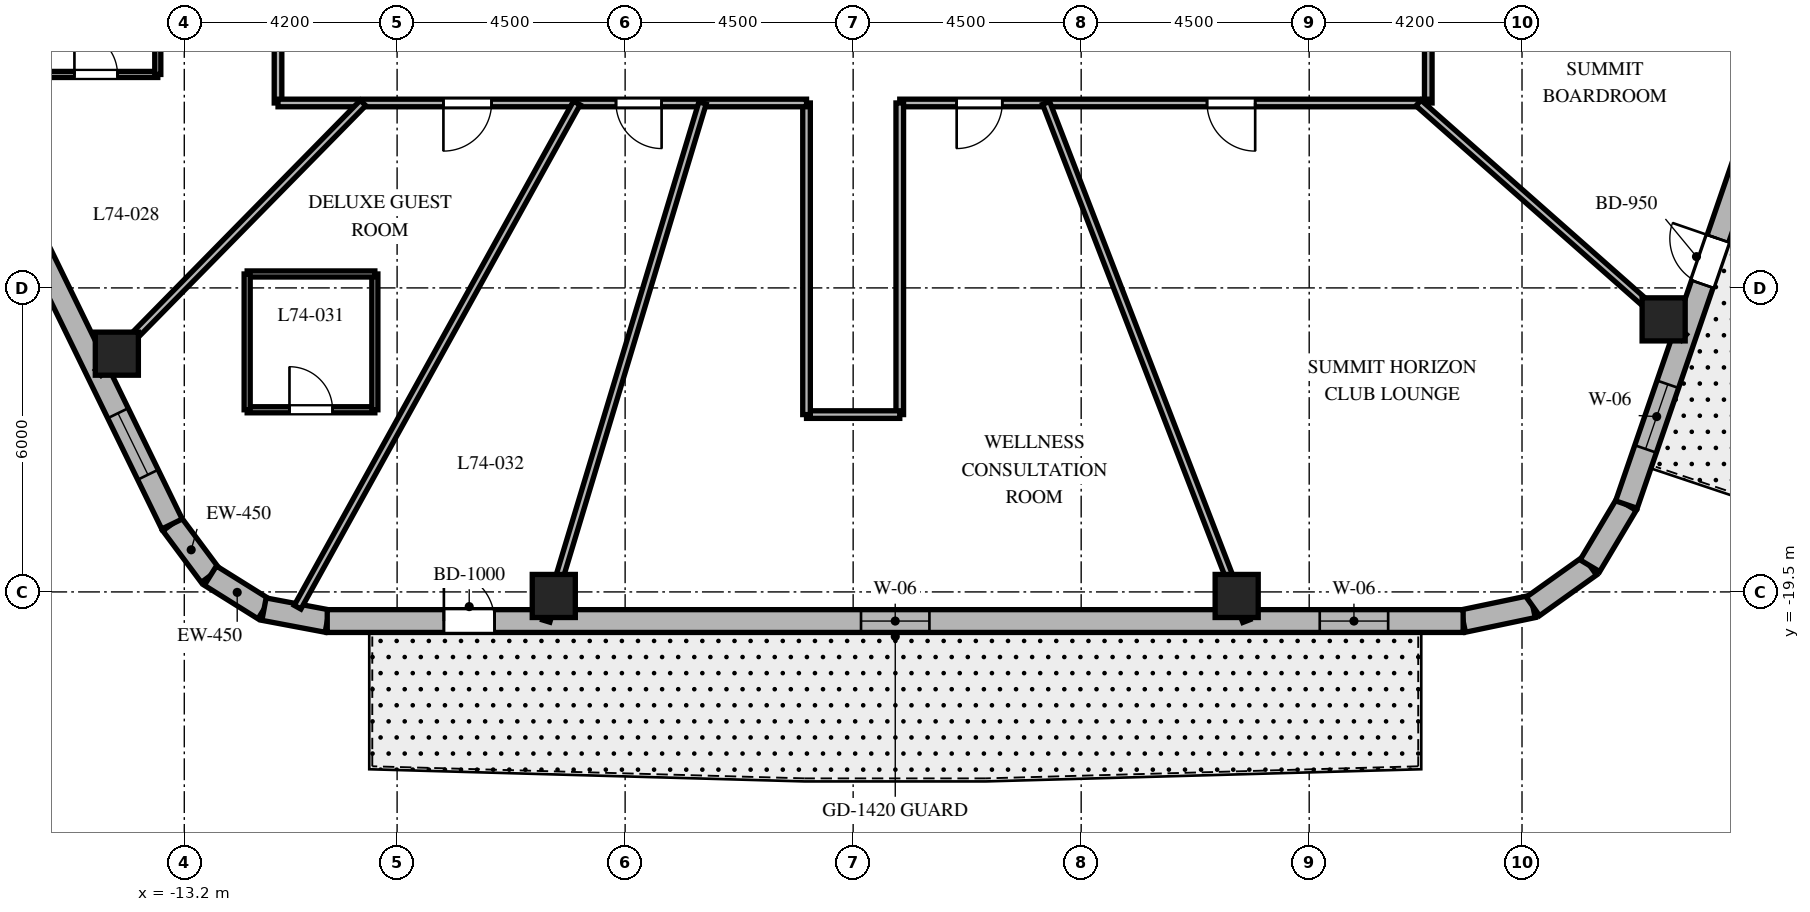
"""IFC4 building model, lengths in metres.
Left out: names, types, materials, properties, quantities, classifications, styles, units other than length and angle.
Written with IfcOpenShell. Run it as: python <this file> out.ifc"""

import sys

from ifc_helpers import new_model, si_unit, direction, frame, frame_2d, origin, origin_2d, place, context, subcontext, project, spatial, rectangle, extrude, element, fill, save


model = new_model("IFC4")
c1 = context("Model", 3, precision=1e-05, world=origin(), true_north=direction((0.0, 1.0)))
c2 = subcontext(c1, "Body", "Model", "MODEL_VIEW")
j1 = project(units=[si_unit("LENGTHUNIT", "METRE"), si_unit("PLANEANGLEUNIT", "RADIAN")], contexts=[c1])
p1 = place(None, origin())
s1 = spatial("IfcSite", under=j1, at=p1, CompositionType="ELEMENT")
p2 = place(p1, origin())
s2 = spatial("IfcBuilding", under=s1, at=p2, CompositionType="ELEMENT")
p3 = place(p2, frame((0.0, 0.0, 297.6)))
s3 = spatial("IfcBuildingStorey", under=s2, at=p3, CompositionType="ELEMENT", Elevation=297.6)
for number, where, z_axis, x_axis in (
    (1, (-5.908, -19.58, 0.0), (0.0, 0.0, 1.0), (1.0, 0.0, 0.0)),
    (2, (7.569, -19.58, 0.0), (0.0, 0.0, 1.0), (1.0, 0.0, 0.0)),
    (3, (15.995, -14.121, 0.0), (0.0, 0.0, 1.0), (1.0, 0.0, 0.0)),
    (4, (-14.531, -14.798, 0.0), (0.0, 0.0, 1.0), (1.0, 0.0, 0.0)),
):
    element("IfcColumn", number, at=place(p3, frame(where, z_axis=z_axis, x_axis=x_axis)), inside=s3, PredefinedType="COLUMN", context=c2, shape_type="SweptSolid", body=[
        extrude(rectangle(XDim=0.85, YDim=0.85, at=origin_2d()), origin(), (0.0, 0.0, 1.0), 3.9),
    ])
p4 = place(p3, frame((-13.443, -18.16, 0.0), z_axis=(0.0, 0.0, 1.0), x_axis=(0.597042425808, -0.802209661987, 0.0)))
e5 = element("IfcWall", 5, at=p4, inside=s3, PredefinedType="SOLIDWALL", context=c2, shape_type="SweptSolid", body=[
    extrude(rectangle(XDim=1.27, YDim=0.45, at=frame_2d((0.635, 0.0))), origin(), (0.0, 0.0, 1.0), 3.6),
])
p5 = place(p3, frame((-12.685, -19.178, 0.0), z_axis=(0.0, 0.0, 1.0), x_axis=(0.848031272749, -0.529946186362, 0.0)))
e6 = element("IfcWall", 6, at=p5, inside=s3, PredefinedType="SOLIDWALL", context=c2, shape_type="SweptSolid", body=[
    extrude(rectangle(XDim=1.248, YDim=0.45, at=frame_2d((0.624, 0.0))), origin(), (0.0, 0.0, 1.0), 3.6),
])
p6 = place(p3, frame((-11.626, -19.84, 0.0), z_axis=(0.0, 0.0, 1.0), x_axis=(0.982701956681, -0.185194126083, 0.0)))
e7 = element("IfcWall", 7, at=p6, inside=s3, PredefinedType="SOLIDWALL", context=c2, shape_type="SweptSolid", body=[
    extrude(rectangle(XDim=1.27, YDim=0.45, at=frame_2d((0.635, 0.0))), origin(), (0.0, 0.0, 1.0), 3.6),
])
p7 = place(p3, frame((12.038, -20.075, 0.0), z_axis=(0.0, 0.0, 1.0), x_axis=(0.978750122553, 0.205056571711, 0.0)))
e8 = element("IfcWall", 8, at=p7, inside=s3, PredefinedType="SOLIDWALL", context=c2, shape_type="SweptSolid", body=[
    extrude(rectangle(XDim=1.406, YDim=0.45, at=frame_2d((0.703, 0.0))), origin(), (0.0, 0.0, 1.0), 3.6),
])
p8 = place(p3, frame((13.415, -19.787, 0.0), z_axis=(0.0, 0.0, 1.0), x_axis=(0.814055493997, 0.580787097561, 0.0)))
e9 = element("IfcWall", 9, at=p8, inside=s3, PredefinedType="SOLIDWALL", context=c2, shape_type="SweptSolid", body=[
    extrude(rectangle(XDim=1.383, YDim=0.45, at=frame_2d((0.691, 0.0))), origin(), (0.0, 0.0, 1.0), 3.6),
])
p9 = place(p3, frame((14.54, -18.984, 0.0), z_axis=(0.0, 0.0, 1.0), x_axis=(0.512374906623, 0.858761873317, 0.0)))
e10 = element("IfcWall", 10, at=p9, inside=s3, PredefinedType="SOLIDWALL", context=c2, shape_type="SweptSolid", body=[
    extrude(rectangle(XDim=1.406, YDim=0.45, at=frame_2d((0.703, 0.0))), origin(), (0.0, 0.0, 1.0), 3.6),
])
p10 = place(p3, frame((-10.379, -20.075, 0.0), z_axis=(0.0, 0.0, 1.0), x_axis=(1.0, 0.0, 0.0)))
e11 = element("IfcWall", 11, at=p10, inside=s3, PredefinedType="SOLIDWALL", context=c2, shape_type="SweptSolid", body=[
    extrude(rectangle(XDim=22.417, YDim=0.45, at=frame_2d((11.208, 0.0))), origin(), (0.0, 0.0, 1.0), 3.6),
])
p11 = place(p10, frame((2.302, 0.0, 0.0)))
e12 = element("IfcOpeningElement", 12, at=p11, cuts=e11, PredefinedType="OPENING", context=c2, shape_type="SweptSolid", body=[
    extrude(rectangle(XDim=1.0, YDim=2.15, at=frame_2d((0.5, 1.075))), frame((0.0, 0.235, 0.0), z_axis=(0.0, -1.0, 0.0), x_axis=(1.0, 0.0, 0.0)), (0.0, 0.0, 1.0), 0.47),
])
p12 = place(p10, frame((10.534, 0.0, 0.8)))
e13 = element("IfcOpeningElement", 13, at=p12, cuts=e11, PredefinedType="OPENING", context=c2, shape_type="SweptSolid", body=[
    extrude(rectangle(XDim=1.35, YDim=1.75, at=frame_2d((0.675, 0.875))), frame((0.0, 0.235, 0.0), z_axis=(0.0, -1.0, 0.0), x_axis=(1.0, 0.0, 0.0)), (0.0, 0.0, 1.0), 0.47),
])
p13 = place(p10, frame((19.587, 0.0, 0.8)))
e14 = element("IfcOpeningElement", 14, at=p13, cuts=e11, PredefinedType="OPENING", context=c2, shape_type="SweptSolid", body=[
    extrude(rectangle(XDim=1.35, YDim=1.75, at=frame_2d((0.675, 0.875))), frame((0.0, 0.235, 0.0), z_axis=(0.0, -1.0, 0.0), x_axis=(1.0, 0.0, 0.0)), (0.0, 0.0, 1.0), 0.47),
])
p14 = place(p3, frame((15.26, -17.776, 0.0), z_axis=(0.0, 0.0, 1.0), x_axis=(0.325407437101, 0.945573899745, 0.0)))
e15 = element("IfcWall", 15, at=p14, inside=s3, PredefinedType="SOLIDWALL", context=c2, shape_type="SweptSolid", body=[
    extrude(rectangle(XDim=18.552, YDim=0.45, at=frame_2d((9.276, 0.0))), origin(), (0.0, 0.0, 1.0), 3.6),
])
p15 = place(p14, frame((4.602, 0.0, 0.0)))
e16 = element("IfcOpeningElement", 16, at=p15, cuts=e15, PredefinedType="OPENING", context=c2, shape_type="SweptSolid", body=[
    extrude(rectangle(XDim=0.95, YDim=2.15, at=frame_2d((0.475, 1.075))), frame((0.0, 0.235, 0.0), z_axis=(0.0, -1.0, 0.0), x_axis=(1.0, 0.0, 0.0)), (0.0, 0.0, 1.0), 0.47),
])
p16 = place(p14, frame((1.161, 0.0, 0.8)))
e17 = element("IfcOpeningElement", 17, at=p16, cuts=e15, PredefinedType="OPENING", context=c2, shape_type="SweptSolid", body=[
    extrude(rectangle(XDim=1.35, YDim=1.75, at=frame_2d((0.675, 0.875))), frame((0.0, 0.235, 0.0), z_axis=(0.0, -1.0, 0.0), x_axis=(1.0, 0.0, 0.0)), (0.0, 0.0, 1.0), 0.47),
])
p17 = place(p14, frame((8.548, 0.0, 0.8)))
e18 = element("IfcOpeningElement", 18, at=p17, cuts=e15, PredefinedType="OPENING", context=c2, shape_type="SweptSolid", body=[
    extrude(rectangle(XDim=1.35, YDim=1.75, at=frame_2d((0.675, 0.875))), frame((0.0, 0.235, 0.0), z_axis=(0.0, -1.0, 0.0), x_axis=(1.0, 0.0, 0.0)), (0.0, 0.0, 1.0), 0.47),
])
p18 = place(p14, frame((15.987, 0.0, 0.8)))
e19 = element("IfcOpeningElement", 19, at=p18, cuts=e15, PredefinedType="OPENING", context=c2, shape_type="SweptSolid", body=[
    extrude(rectangle(XDim=1.35, YDim=1.75, at=frame_2d((0.675, 0.875))), frame((0.0, 0.235, 0.0), z_axis=(0.0, -1.0, 0.0), x_axis=(1.0, 0.0, 0.0)), (0.0, 0.0, 1.0), 0.47),
])
p19 = place(p3, frame((-21.138, -2.371, 0.0), z_axis=(0.0, 0.0, 1.0), x_axis=(0.438128124058, -0.89891253574, 0.0)))
e20 = element("IfcWall", 20, at=p19, inside=s3, PredefinedType="SOLIDWALL", context=c2, shape_type="SweptSolid", body=[
    extrude(rectangle(XDim=17.565, YDim=0.45, at=frame_2d((8.782, 0.0))), origin(), (0.0, 0.0, 1.0), 3.6),
])
p20 = place(p19, frame((1.133, 0.0, 0.8)))
e21 = element("IfcOpeningElement", 21, at=p20, cuts=e20, PredefinedType="OPENING", context=c2, shape_type="SweptSolid", body=[
    extrude(rectangle(XDim=1.35, YDim=1.75, at=frame_2d((0.675, 0.875))), frame((0.0, 0.235, 0.0), z_axis=(0.0, -1.0, 0.0), x_axis=(1.0, 0.0, 0.0)), (0.0, 0.0, 1.0), 0.47),
])
p21 = place(p19, frame((8.158, 0.0, 0.8)))
e22 = element("IfcOpeningElement", 22, at=p21, cuts=e20, PredefinedType="OPENING", context=c2, shape_type="SweptSolid", body=[
    extrude(rectangle(XDim=1.35, YDim=1.75, at=frame_2d((0.675, 0.875))), frame((0.0, 0.235, 0.0), z_axis=(0.0, -1.0, 0.0), x_axis=(1.0, 0.0, 0.0)), (0.0, 0.0, 1.0), 0.47),
])
p22 = place(p19, frame((15.132, 0.0, 0.8)))
e23 = element("IfcOpeningElement", 23, at=p22, cuts=e20, PredefinedType="OPENING", context=c2, shape_type="SweptSolid", body=[
    extrude(rectangle(XDim=1.35, YDim=1.75, at=frame_2d((0.675, 0.875))), frame((0.0, 0.235, 0.0), z_axis=(0.0, -1.0, 0.0), x_axis=(1.0, 0.0, 0.0)), (0.0, 0.0, 1.0), 0.47),
])
p23 = place(p3, frame((-11.35, -9.85, 0.0), z_axis=(0.0, 0.0, 1.0), x_axis=(0.0, 1.0, 0.0)))
e24 = element("IfcWall", 24, at=p23, inside=s3, PredefinedType="PARTITIONING", context=c2, shape_type="SweptSolid", body=[
    extrude(rectangle(XDim=12.4, YDim=0.15, at=frame_2d((6.2, 0.0))), origin(), (0.0, 0.0, 1.0), 2.894),
])
p24 = place(p23, frame((8.81, 0.0, 0.0)))
e25 = element("IfcOpeningElement", 25, at=p24, cuts=e24, PredefinedType="OPENING", context=c2, shape_type="SweptSolid", body=[
    extrude(rectangle(XDim=1.0, YDim=2.03, at=frame_2d((0.5, 1.015))), frame((0.0, 0.085, 0.0), z_axis=(0.0, -1.0, 0.0), x_axis=(1.0, 0.0, 0.0)), (0.0, 0.0, 1.0), 0.17),
])
p25 = place(p3, frame((11.35, -4.4, 0.0), z_axis=(0.0, 0.0, 1.0), x_axis=(0.0, -1.0, 0.0)))
e26 = element("IfcWall", 26, at=p25, inside=s3, PredefinedType="PARTITIONING", context=c2, shape_type="SweptSolid", body=[
    extrude(rectangle(XDim=5.45, YDim=0.15, at=frame_2d((2.725, 0.0))), origin(), (0.0, 0.0, 1.0), 2.816),
])
p26 = place(p3, frame((11.35, -9.85, 0.0), z_axis=(0.0, 0.0, 1.0), x_axis=(-1.0, 0.0, 0.0)))
e27 = element("IfcWall", 27, at=p26, inside=s3, PredefinedType="PARTITIONING", context=c2, shape_type="SweptSolid", body=[
    extrude(rectangle(XDim=10.43, YDim=0.15, at=frame_2d((5.215, 0.0))), origin(), (0.0, 0.0, 1.0), 2.894),
])
p27 = place(p26, frame((8.407, 0.0, 0.0)))
e28 = element("IfcOpeningElement", 28, at=p27, cuts=e27, PredefinedType="OPENING", context=c2, shape_type="SweptSolid", body=[
    extrude(rectangle(XDim=0.9, YDim=2.03, at=frame_2d((0.45, 1.015))), frame((0.0, 0.085, 0.0), z_axis=(0.0, -1.0, 0.0), x_axis=(1.0, 0.0, 0.0)), (0.0, 0.0, 1.0), 0.17),
])
p28 = place(p26, frame((3.416, 0.0, 0.0)))
e29 = element("IfcOpeningElement", 29, at=p28, cuts=e27, PredefinedType="OPENING", context=c2, shape_type="SweptSolid", body=[
    extrude(rectangle(XDim=0.95, YDim=2.03, at=frame_2d((0.475, 1.015))), frame((0.0, 0.085, 0.0), z_axis=(0.0, -1.0, 0.0), x_axis=(1.0, 0.0, 0.0)), (0.0, 0.0, 1.0), 0.17),
])
p29 = place(p3, frame((0.92, -9.85, 0.0), z_axis=(0.0, 0.0, 1.0), x_axis=(0.0, -1.0, 0.0)))
e30 = element("IfcWall", 30, at=p29, inside=s3, PredefinedType="PARTITIONING", context=c2, shape_type="SweptSolid", body=[
    extrude(rectangle(XDim=6.15, YDim=0.15, at=frame_2d((3.075, 0.0))), origin(), (0.0, 0.0, 1.0), 3.04),
])
p30 = place(p3, frame((0.92, -16.0, 0.0), z_axis=(0.0, 0.0, 1.0), x_axis=(-1.0, 0.0, 0.0)))
e31 = element("IfcWall", 31, at=p30, inside=s3, PredefinedType="PARTITIONING", context=c2, shape_type="SweptSolid", body=[
    extrude(rectangle(XDim=1.84, YDim=0.15, at=frame_2d((0.92, 0.0))), origin(), (0.0, 0.0, 1.0), 3.6),
])
p31 = place(p3, frame((-0.92, -16.0, 0.0), z_axis=(0.0, 0.0, 1.0), x_axis=(0.0, 1.0, 0.0)))
e32 = element("IfcWall", 32, at=p31, inside=s3, PredefinedType="PARTITIONING", context=c2, shape_type="SweptSolid", body=[
    extrude(rectangle(XDim=6.15, YDim=0.15, at=frame_2d((3.075, 0.0))), origin(), (0.0, 0.0, 1.0), 3.04),
])
p32 = place(p3, frame((-0.92, -9.85, 0.0), z_axis=(0.0, 0.0, 1.0), x_axis=(-1.0, 0.0, 0.0)))
e33 = element("IfcWall", 33, at=p32, inside=s3, PredefinedType="PARTITIONING", context=c2, shape_type="SweptSolid", body=[
    extrude(rectangle(XDim=10.43, YDim=0.15, at=frame_2d((5.215, 0.0))), origin(), (0.0, 0.0, 1.0), 2.816),
])
p33 = place(p32, frame((6.216, 0.0, 0.0)))
e34 = element("IfcOpeningElement", 34, at=p33, cuts=e33, PredefinedType="OPENING", context=c2, shape_type="SweptSolid", body=[
    extrude(rectangle(XDim=0.95, YDim=2.03, at=frame_2d((0.475, 1.015))), frame((0.0, 0.085, 0.0), z_axis=(0.0, -1.0, 0.0), x_axis=(1.0, 0.0, 0.0)), (0.0, 0.0, 1.0), 0.17),
])
p34 = place(p32, frame((2.86, 0.0, 0.0)))
e35 = element("IfcOpeningElement", 35, at=p34, cuts=e33, PredefinedType="OPENING", context=c2, shape_type="SweptSolid", body=[
    extrude(rectangle(XDim=0.9, YDim=2.03, at=frame_2d((0.45, 1.015))), frame((0.0, 0.085, 0.0), z_axis=(0.0, -1.0, 0.0), x_axis=(1.0, 0.0, 0.0)), (0.0, 0.0, 1.0), 0.17),
])
p35 = place(p3, frame((-9.672, -9.85, 0.0), z_axis=(0.0, 0.0, 1.0), x_axis=(-0.700629771301, -0.713524998558, 0.0)))
e36 = element("IfcWall", 36, at=p35, inside=s3, PredefinedType="PARTITIONING", context=c2, shape_type="SweptSolid", body=[
    extrude(rectangle(XDim=7.459, YDim=0.15, at=frame_2d((3.73, 0.0))), origin(), (0.0, 0.0, 1.0), 2.94),
])
p36 = place(p3, frame((-5.454, -9.85, 0.0), z_axis=(0.0, 0.0, 1.0), x_axis=(-0.48439420613, -0.874849846012, 0.0)))
e37 = element("IfcWall", 37, at=p36, inside=s3, PredefinedType="PARTITIONING", context=c2, shape_type="SweptSolid", body=[
    extrude(rectangle(XDim=11.375, YDim=0.15, at=frame_2d((5.688, 0.0))), origin(), (0.0, 0.0, 1.0), 2.94),
])
p37 = place(p3, frame((-2.972, -9.85, 0.0), z_axis=(0.0, 0.0, 1.0), x_axis=(-0.288872169679, -0.957367677324, 0.0)))
e38 = element("IfcWall", 38, at=p37, inside=s3, PredefinedType="PARTITIONING", context=c2, shape_type="SweptSolid", body=[
    extrude(rectangle(XDim=10.68, YDim=0.15, at=frame_2d((5.34, 0.0))), origin(), (0.0, 0.0, 1.0), 2.816),
])
p38 = place(p3, frame((3.808, -9.85, 0.0), z_axis=(0.0, 0.0, 1.0), x_axis=(0.360587327934, -0.932725457427, 0.0)))
e39 = element("IfcWall", 39, at=p38, inside=s3, PredefinedType="PARTITIONING", context=c2, shape_type="SweptSolid", body=[
    extrude(rectangle(XDim=10.962, YDim=0.15, at=frame_2d((5.481, 0.0))), origin(), (0.0, 0.0, 1.0), 2.894),
])
p39 = place(p3, frame((11.157, -9.85, 0.0), z_axis=(0.0, 0.0, 1.0), x_axis=(0.74966962095, -0.661812253909, 0.0)))
e40 = element("IfcWall", 40, at=p39, inside=s3, PredefinedType="PARTITIONING", context=c2, shape_type="SweptSolid", body=[
    extrude(rectangle(XDim=6.989, YDim=0.15, at=frame_2d((3.494, 0.0))), origin(), (0.0, 0.0, 1.0), 2.94),
])
p40 = place(p3, frame((-16.163, -9.287, 0.0), z_axis=(0.0, 0.0, 1.0), x_axis=(1.0, 0.0, 0.0)))
e41 = element("IfcWall", 41, at=p40, inside=s3, PredefinedType="PARTITIONING", context=c2, shape_type="SweptSolid", body=[
    extrude(rectangle(XDim=2.44, YDim=0.12, at=frame_2d((1.22, 0.0))), origin(), (0.0, 0.0, 1.0), 3.126),
])
p41 = place(p40, frame((0.795, 0.0, 0.0)))
e42 = element("IfcOpeningElement", 42, at=p41, cuts=e41, PredefinedType="OPENING", context=c2, shape_type="SweptSolid", body=[
    extrude(rectangle(XDim=0.85, YDim=2.03, at=frame_2d((0.425, 1.015))), frame((0.0, 0.07, 0.0), z_axis=(0.0, -1.0, 0.0), x_axis=(1.0, 0.0, 0.0)), (0.0, 0.0, 1.0), 0.14),
])
p42 = place(p3, frame((-13.723, -9.287, 0.0), z_axis=(0.0, 0.0, 1.0), x_axis=(0.0, 1.0, 0.0)))
e43 = element("IfcWall", 43, at=p42, inside=s3, PredefinedType="PARTITIONING", context=c2, shape_type="SweptSolid", body=[
    extrude(rectangle(XDim=2.61, YDim=0.12, at=frame_2d((1.305, 0.0))), origin(), (0.0, 0.0, 1.0), 3.172),
])
p43 = place(p3, frame((-11.959, -15.905, 0.0), z_axis=(0.0, 0.0, 1.0), x_axis=(1.0, 0.0, 0.0)))
e44 = element("IfcWall", 44, at=p43, inside=s3, PredefinedType="PARTITIONING", context=c2, shape_type="SweptSolid", body=[
    extrude(rectangle(XDim=2.52, YDim=0.12, at=frame_2d((1.26, 0.0))), origin(), (0.0, 0.0, 1.0), 3.6),
])
p44 = place(p43, frame((0.835, 0.0, 0.0)))
e45 = element("IfcOpeningElement", 45, at=p44, cuts=e44, PredefinedType="OPENING", context=c2, shape_type="SweptSolid", body=[
    extrude(rectangle(XDim=0.85, YDim=2.03, at=frame_2d((0.425, 1.015))), frame((0.0, 0.07, 0.0), z_axis=(0.0, -1.0, 0.0), x_axis=(1.0, 0.0, 0.0)), (0.0, 0.0, 1.0), 0.14),
])
p45 = place(p3, frame((-9.439, -15.905, 0.0), z_axis=(0.0, 0.0, 1.0), x_axis=(0.0, 1.0, 0.0)))
e46 = element("IfcWall", 46, at=p45, inside=s3, PredefinedType="PARTITIONING", context=c2, shape_type="SweptSolid", body=[
    extrude(rectangle(XDim=2.68, YDim=0.12, at=frame_2d((1.34, 0.0))), origin(), (0.0, 0.0, 1.0), 3.172),
])
p46 = place(p3, frame((-9.439, -13.225, 0.0), z_axis=(0.0, 0.0, 1.0), x_axis=(-1.0, 0.0, 0.0)))
e47 = element("IfcWall", 47, at=p46, inside=s3, PredefinedType="PARTITIONING", context=c2, shape_type="SweptSolid", body=[
    extrude(rectangle(XDim=2.52, YDim=0.12, at=frame_2d((1.26, 0.0))), origin(), (0.0, 0.0, 1.0), 3.172),
])
p47 = place(p3, frame((-11.959, -13.225, 0.0), z_axis=(0.0, 0.0, 1.0), x_axis=(0.0, -1.0, 0.0)))
e48 = element("IfcWall", 48, at=p47, inside=s3, PredefinedType="PARTITIONING", context=c2, shape_type="SweptSolid", body=[
    extrude(rectangle(XDim=2.68, YDim=0.12, at=frame_2d((1.34, 0.0))), origin(), (0.0, 0.0, 1.0), 3.6),
])
p48 = place(p11, origin())
e49 = element("IfcDoor", 49, at=p48, inside=s3, OperationType="SINGLE_SWING_LEFT", PredefinedType="DOOR", context=c2, shape_type="SweptSolid", body=[
    extrude(rectangle(XDim=1.0, YDim=2.15, at=frame_2d((0.5, 1.075))), frame((0.0, 0.025, 0.0), z_axis=(0.0, -1.0, 0.0), x_axis=(1.0, 0.0, 0.0)), (0.0, 0.0, 1.0), 0.05),
])
fill(e12, e49)
p49 = place(p12, origin())
e50 = element("IfcWindow", 50, at=p49, inside=s3, PartitioningType="SINGLE_PANEL", PredefinedType="WINDOW", context=c2, shape_type="SweptSolid", body=[
    extrude(rectangle(XDim=1.35, YDim=1.75, at=frame_2d((0.675, 0.875))), frame((0.0, 0.03, 0.0), z_axis=(0.0, -1.0, 0.0), x_axis=(1.0, 0.0, 0.0)), (0.0, 0.0, 1.0), 0.06),
])
fill(e13, e50)
p50 = place(p13, origin())
e51 = element("IfcWindow", 51, at=p50, inside=s3, PartitioningType="SINGLE_PANEL", PredefinedType="WINDOW", context=c2, shape_type="SweptSolid", body=[
    extrude(rectangle(XDim=1.35, YDim=1.75, at=frame_2d((0.675, 0.875))), frame((0.0, 0.03, 0.0), z_axis=(0.0, -1.0, 0.0), x_axis=(1.0, 0.0, 0.0)), (0.0, 0.0, 1.0), 0.06),
])
fill(e14, e51)
p51 = place(p15, origin())
e52 = element("IfcDoor", 52, at=p51, inside=s3, OperationType="SINGLE_SWING_RIGHT", PredefinedType="DOOR", context=c2, shape_type="SweptSolid", body=[
    extrude(rectangle(XDim=0.95, YDim=2.15, at=frame_2d((0.475, 1.075))), frame((0.0, 0.025, 0.0), z_axis=(0.0, -1.0, 0.0), x_axis=(1.0, 0.0, 0.0)), (0.0, 0.0, 1.0), 0.05),
])
fill(e16, e52)
p52 = place(p16, origin())
e53 = element("IfcWindow", 53, at=p52, inside=s3, PartitioningType="SINGLE_PANEL", PredefinedType="WINDOW", context=c2, shape_type="SweptSolid", body=[
    extrude(rectangle(XDim=1.35, YDim=1.75, at=frame_2d((0.675, 0.875))), frame((0.0, 0.03, 0.0), z_axis=(0.0, -1.0, 0.0), x_axis=(1.0, 0.0, 0.0)), (0.0, 0.0, 1.0), 0.06),
])
fill(e17, e53)
p53 = place(p22, origin())
e54 = element("IfcWindow", 54, at=p53, inside=s3, PartitioningType="SINGLE_PANEL", PredefinedType="WINDOW", context=c2, shape_type="SweptSolid", body=[
    extrude(rectangle(XDim=1.35, YDim=1.75, at=frame_2d((0.675, 0.875))), frame((0.0, 0.03, 0.0), z_axis=(0.0, -1.0, 0.0), x_axis=(1.0, 0.0, 0.0)), (0.0, 0.0, 1.0), 0.06),
])
fill(e23, e54)
p54 = place(p41, origin())
e55 = element("IfcDoor", 55, at=p54, inside=s3, OperationType="SINGLE_SWING_LEFT", PredefinedType="DOOR", context=c2, shape_type="SweptSolid", body=[
    extrude(rectangle(XDim=0.85, YDim=2.03, at=frame_2d((0.425, 1.015))), frame((0.0, 0.025, 0.0), z_axis=(0.0, -1.0, 0.0), x_axis=(1.0, 0.0, 0.0)), (0.0, 0.0, 1.0), 0.05),
])
fill(e42, e55)
p55 = place(p33, origin())
e56 = element("IfcDoor", 56, at=p55, inside=s3, OperationType="SINGLE_SWING_RIGHT", PredefinedType="DOOR", context=c2, shape_type="SweptSolid", body=[
    extrude(rectangle(XDim=0.95, YDim=2.03, at=frame_2d((0.475, 1.015))), frame((0.0, 0.025, 0.0), z_axis=(0.0, -1.0, 0.0), x_axis=(1.0, 0.0, 0.0)), (0.0, 0.0, 1.0), 0.05),
])
fill(e34, e56)
p56 = place(p44, origin())
e57 = element("IfcDoor", 57, at=p56, inside=s3, OperationType="SINGLE_SWING_LEFT", PredefinedType="DOOR", context=c2, shape_type="SweptSolid", body=[
    extrude(rectangle(XDim=0.85, YDim=2.03, at=frame_2d((0.425, 1.015))), frame((0.0, 0.025, 0.0), z_axis=(0.0, -1.0, 0.0), x_axis=(1.0, 0.0, 0.0)), (0.0, 0.0, 1.0), 0.05),
])
fill(e45, e57)
p57 = place(p34, origin())
e58 = element("IfcDoor", 58, at=p57, inside=s3, OperationType="SINGLE_SWING_LEFT", PredefinedType="DOOR", context=c2, shape_type="SweptSolid", body=[
    extrude(rectangle(XDim=0.9, YDim=2.03, at=frame_2d((0.45, 1.015))), frame((0.0, 0.025, 0.0), z_axis=(0.0, -1.0, 0.0), x_axis=(1.0, 0.0, 0.0)), (0.0, 0.0, 1.0), 0.05),
])
fill(e35, e58)
p58 = place(p27, origin())
e59 = element("IfcDoor", 59, at=p58, inside=s3, OperationType="SINGLE_SWING_RIGHT", PredefinedType="DOOR", context=c2, shape_type="SweptSolid", body=[
    extrude(rectangle(XDim=0.9, YDim=2.03, at=frame_2d((0.45, 1.015))), frame((0.0, 0.025, 0.0), z_axis=(0.0, -1.0, 0.0), x_axis=(1.0, 0.0, 0.0)), (0.0, 0.0, 1.0), 0.05),
])
fill(e28, e59)
p59 = place(p28, origin())
e60 = element("IfcDoor", 60, at=p59, inside=s3, OperationType="SINGLE_SWING_LEFT", PredefinedType="DOOR", context=c2, shape_type="SweptSolid", body=[
    extrude(rectangle(XDim=0.95, YDim=2.03, at=frame_2d((0.475, 1.015))), frame((0.0, 0.025, 0.0), z_axis=(0.0, -1.0, 0.0), x_axis=(1.0, 0.0, 0.0)), (0.0, 0.0, 1.0), 0.05),
])
fill(e29, e60)
save(model, sys.argv[1])
